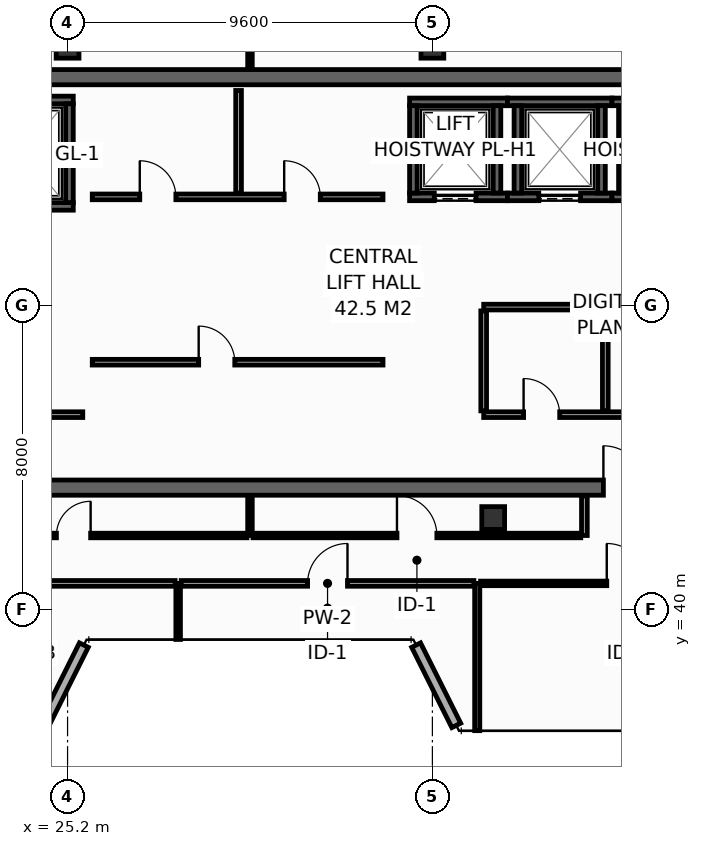
"""IFC4 building model, lengths in metres.
Left out: names, types, materials, properties, quantities, classifications, styles, units other than length and angle.
Written with IfcOpenShell. Run it as: python <this file> out.ifc"""

import sys

from ifc_helpers import new_model, si_unit, direction, frame, frame_2d, origin, origin_2d, place, context, subcontext, project, spatial, rectangle, hollow_rectangle, extrude, element, fill, save


model = new_model("IFC4")
c1 = context("Model", 3, precision=1e-05, world=origin(), true_north=direction((0.0, 1.0)))
c2 = subcontext(c1, "Body", "Model", "MODEL_VIEW")
j1 = project(units=[si_unit("LENGTHUNIT", "METRE"), si_unit("PLANEANGLEUNIT", "RADIAN")], contexts=[c1])
p1 = place(None, origin())
s1 = spatial("IfcSite", under=j1, at=p1, CompositionType="ELEMENT")
p2 = place(p1, origin())
s2 = spatial("IfcBuilding", under=s1, at=p2, CompositionType="ELEMENT")
p3 = place(p2, frame((0.0, 0.0, 323.4)))
s3 = spatial("IfcBuildingStorey", under=s2, at=p3, CompositionType="ELEMENT", Elevation=323.4)
p4 = place(p3, frame((13.7, 43.2, 0.0), z_axis=(0.0, 0.0, 1.0), x_axis=(1.0, 0.0, 0.0)))
e1 = element("IfcWall", 1, at=p4, inside=s3, PredefinedType="SHEAR", context=c2, shape_type="SweptSolid", body=[
    extrude(rectangle(XDim=32.5, YDim=0.4, at=frame_2d((16.25, 0.0))), origin(), (0.0, 0.0, 1.0), 3.9),
])
p5 = place(p4, frame((5.4, 0.0, 0.0)))
e2 = element("IfcOpeningElement", 2, at=p5, cuts=e1, PredefinedType="OPENING", context=c2, shape_type="SweptSolid", body=[
    extrude(rectangle(XDim=1.1, YDim=2.15, at=frame_2d((0.55, 1.075))), frame((0.0, 0.21, 0.0), z_axis=(0.0, -1.0, 0.0), x_axis=(1.0, 0.0, 0.0)), (0.0, 0.0, 1.0), 0.42),
])
p6 = place(p4, frame((25.6, 0.0, 0.0)))
e3 = element("IfcOpeningElement", 3, at=p6, cuts=e1, PredefinedType="OPENING", context=c2, shape_type="SweptSolid", body=[
    extrude(rectangle(XDim=1.1, YDim=2.15, at=frame_2d((0.55, 1.075))), frame((0.0, 0.21, 0.0), z_axis=(0.0, -1.0, 0.0), x_axis=(1.0, 0.0, 0.0)), (0.0, 0.0, 1.0), 0.42),
])
p7 = place(p3, frame((13.7, 54.0, 0.0), z_axis=(0.0, 0.0, 1.0), x_axis=(1.0, 0.0, 0.0)))
e4 = element("IfcWall", 4, at=p7, inside=s3, PredefinedType="SHEAR", context=c2, shape_type="SweptSolid", body=[
    extrude(rectangle(XDim=32.5, YDim=0.4, at=frame_2d((16.25, 0.0))), origin(), (0.0, 0.0, 1.0), 3.9),
])
for number, where, z_axis, x_axis in (
    (5, (25.2, 54.8, 0.0), (0.0, 0.0, 1.0), (1.0, 0.0, 0.0)),
    (6, (34.8, 54.8, 0.0), (0.0, 0.0, 1.0), (1.0, 0.0, 0.0)),
    (7, (36.4, 42.4, 0.0), (0.0, 0.0, 1.0), (1.0, 0.0, 0.0)),
):
    element("IfcColumn", number, at=place(p3, frame(where, z_axis=z_axis, x_axis=x_axis)), inside=s3, PredefinedType="COLUMN", context=c2, shape_type="SweptSolid", body=[
        extrude(hollow_rectangle(XDim=0.6, YDim=0.6, WallThickness=0.028, at=origin_2d()), origin(), (0.0, 0.0, 1.0), 4.2),
    ])
p8 = place(p3, frame((22.5, 50.6, 0.0), z_axis=(0.0, 0.0, 1.0), x_axis=(1.0, 0.0, 0.0)))
e8 = element("IfcWall", 8, at=p8, inside=s3, PredefinedType="SHEAR", context=c2, shape_type="SweptSolid", body=[
    extrude(rectangle(XDim=2.85, YDim=0.2, at=frame_2d((1.425, 0.0))), origin(), (0.0, 0.0, 1.0), 3.68),
])
p9 = place(p8, frame((0.925, 0.0, 0.0)))
e9 = element("IfcOpeningElement", 9, at=p9, cuts=e8, PredefinedType="OPENING", context=c2, shape_type="SweptSolid", body=[
    extrude(rectangle(XDim=1.25, YDim=2.3, at=frame_2d((0.625, 1.15))), frame((0.0, 0.11, 0.0), z_axis=(0.0, -1.0, 0.0), x_axis=(1.0, 0.0, 0.0)), (0.0, 0.0, 1.0), 0.22),
])
p10 = place(p3, frame((22.5, 53.4, 0.0), z_axis=(0.0, 0.0, 1.0), x_axis=(1.0, 0.0, 0.0)))
e10 = element("IfcWall", 10, at=p10, inside=s3, PredefinedType="SHEAR", context=c2, shape_type="SweptSolid", body=[
    extrude(rectangle(XDim=2.85, YDim=0.2, at=frame_2d((1.425, 0.0))), origin(), (0.0, 0.0, 1.0), 3.68),
])
p11 = place(p3, frame((25.25, 50.7, 0.0), z_axis=(0.0, 0.0, 1.0), x_axis=(0.0, 1.0, 0.0)))
e11 = element("IfcWall", 11, at=p11, inside=s3, PredefinedType="SHEAR", context=c2, shape_type="SweptSolid", body=[
    extrude(rectangle(XDim=2.6, YDim=0.2, at=frame_2d((1.3, 0.0))), origin(), (0.0, 0.0, 1.0), 3.68),
])
p12 = place(p3, frame((34.2, 50.85, 0.0), z_axis=(0.0, 0.0, 1.0), x_axis=(1.0, 0.0, 0.0)))
e12 = element("IfcWall", 12, at=p12, inside=s3, PredefinedType="SHEAR", context=c2, shape_type="SweptSolid", body=[
    extrude(rectangle(XDim=2.575, YDim=0.2, at=frame_2d((1.288, 0.0))), origin(), (0.0, 0.0, 1.0), 3.68),
])
p13 = place(p12, frame((0.65, 0.0, 0.0)))
e13 = element("IfcOpeningElement", 13, at=p13, cuts=e12, PredefinedType="OPENING", context=c2, shape_type="SweptSolid", body=[
    extrude(rectangle(XDim=1.1, YDim=2.2, at=frame_2d((0.55, 1.1))), frame((0.0, 0.11, 0.0), z_axis=(0.0, -1.0, 0.0), x_axis=(1.0, 0.0, 0.0)), (0.0, 0.0, 1.0), 0.22),
])
p14 = place(p3, frame((34.2, 53.35, 0.0), z_axis=(0.0, 0.0, 1.0), x_axis=(1.0, 0.0, 0.0)))
e14 = element("IfcWall", 14, at=p14, inside=s3, PredefinedType="SHEAR", context=c2, shape_type="SweptSolid", body=[
    extrude(rectangle(XDim=2.575, YDim=0.2, at=frame_2d((1.288, 0.0))), origin(), (0.0, 0.0, 1.0), 3.68),
])
for number, where, z_axis, x_axis in (
    (15, (34.3, 50.95, 0.0), (0.0, 0.0, 1.0), (0.0, 1.0, 0.0)),
    (16, (36.5, 50.95, 0.0), (0.0, 0.0, 1.0), (0.0, 1.0, 0.0)),
):
    element("IfcWall", number, at=place(p3, frame(where, z_axis=z_axis, x_axis=x_axis)), inside=s3, PredefinedType="SHEAR", context=c2, shape_type="SweptSolid", body=[
        extrude(rectangle(XDim=2.3, YDim=0.2, at=frame_2d((1.15, 0.0))), origin(), (0.0, 0.0, 1.0), 3.68),
    ])
p15 = place(p3, frame((36.775, 50.85, 0.0), z_axis=(0.0, 0.0, 1.0), x_axis=(1.0, 0.0, 0.0)))
e17 = element("IfcWall", 17, at=p15, inside=s3, PredefinedType="SHEAR", context=c2, shape_type="SweptSolid", body=[
    extrude(rectangle(XDim=2.75, YDim=0.2, at=frame_2d((1.375, 0.0))), origin(), (0.0, 0.0, 1.0), 3.68),
])
p16 = place(p15, frame((0.825, 0.0, 0.0)))
e18 = element("IfcOpeningElement", 18, at=p16, cuts=e17, PredefinedType="OPENING", context=c2, shape_type="SweptSolid", body=[
    extrude(rectangle(XDim=1.1, YDim=2.2, at=frame_2d((0.55, 1.1))), frame((0.0, 0.11, 0.0), z_axis=(0.0, -1.0, 0.0), x_axis=(1.0, 0.0, 0.0)), (0.0, 0.0, 1.0), 0.22),
])
p17 = place(p3, frame((36.775, 53.35, 0.0), z_axis=(0.0, 0.0, 1.0), x_axis=(1.0, 0.0, 0.0)))
e19 = element("IfcWall", 19, at=p17, inside=s3, PredefinedType="SHEAR", context=c2, shape_type="SweptSolid", body=[
    extrude(rectangle(XDim=2.75, YDim=0.2, at=frame_2d((1.375, 0.0))), origin(), (0.0, 0.0, 1.0), 3.68),
])
for number, where, z_axis, x_axis in (
    (20, (37.05, 50.95, 0.0), (0.0, 0.0, 1.0), (0.0, 1.0, 0.0)),
    (21, (39.25, 50.95, 0.0), (0.0, 0.0, 1.0), (0.0, 1.0, 0.0)),
):
    element("IfcWall", number, at=place(p3, frame(where, z_axis=z_axis, x_axis=x_axis)), inside=s3, PredefinedType="SHEAR", context=c2, shape_type="SweptSolid", body=[
        extrude(rectangle(XDim=2.3, YDim=0.2, at=frame_2d((1.15, 0.0))), origin(), (0.0, 0.0, 1.0), 3.68),
    ])
p18 = place(p3, frame((39.525, 50.85, 0.0), z_axis=(0.0, 0.0, 1.0), x_axis=(1.0, 0.0, 0.0)))
e22 = element("IfcWall", 22, at=p18, inside=s3, PredefinedType="SHEAR", context=c2, shape_type="SweptSolid", body=[
    extrude(rectangle(XDim=3.045, YDim=0.2, at=frame_2d((1.522, 0.0))), origin(), (0.0, 0.0, 1.0), 3.68),
])
p19 = place(p18, frame((0.825, 0.0, 0.0)))
e23 = element("IfcOpeningElement", 23, at=p19, cuts=e22, PredefinedType="OPENING", context=c2, shape_type="SweptSolid", body=[
    extrude(rectangle(XDim=1.1, YDim=2.2, at=frame_2d((0.55, 1.1))), frame((0.0, 0.11, 0.0), z_axis=(0.0, -1.0, 0.0), x_axis=(1.0, 0.0, 0.0)), (0.0, 0.0, 1.0), 0.22),
])
p20 = place(p3, frame((39.525, 53.35, 0.0), z_axis=(0.0, 0.0, 1.0), x_axis=(1.0, 0.0, 0.0)))
e24 = element("IfcWall", 24, at=p20, inside=s3, PredefinedType="SHEAR", context=c2, shape_type="SweptSolid", body=[
    extrude(rectangle(XDim=3.045, YDim=0.2, at=frame_2d((1.522, 0.0))), origin(), (0.0, 0.0, 1.0), 3.68),
])
p21 = place(p3, frame((39.8, 50.95, 0.0), z_axis=(0.0, 0.0, 1.0), x_axis=(0.0, 1.0, 0.0)))
e25 = element("IfcWall", 25, at=p21, inside=s3, PredefinedType="SHEAR", context=c2, shape_type="SweptSolid", body=[
    extrude(rectangle(XDim=2.3, YDim=0.2, at=frame_2d((1.15, 0.0))), origin(), (0.0, 0.0, 1.0), 3.68),
])
p22 = place(p3, frame((22.68, 45.12, 0.0), z_axis=(0.0, 0.0, 1.0), x_axis=(1.0, 0.0, 0.0)))
e26 = element("IfcWall", 26, at=p22, inside=s3, PredefinedType="PARTITIONING", context=c2, shape_type="SweptSolid", body=[
    extrude(rectangle(XDim=2.92, YDim=0.15, at=frame_2d((1.46, 0.0))), origin(), (0.0, 0.0, 1.0), 3.9),
])
p23 = place(p22, frame((0.85, 0.0, 0.0)))
e27 = element("IfcOpeningElement", 27, at=p23, cuts=e26, PredefinedType="OPENING", context=c2, shape_type="SweptSolid", body=[
    extrude(rectangle(XDim=1.1, YDim=2.15, at=frame_2d((0.55, 1.075))), frame((0.0, 0.085, 0.0), z_axis=(0.0, -1.0, 0.0), x_axis=(1.0, 0.0, 0.0)), (0.0, 0.0, 1.0), 0.17),
])
p24 = place(p3, frame((36.15, 45.12, 0.0), z_axis=(0.0, 0.0, 1.0), x_axis=(1.0, 0.0, 0.0)))
e28 = element("IfcWall", 28, at=p24, inside=s3, PredefinedType="PARTITIONING", context=c2, shape_type="SweptSolid", body=[
    extrude(rectangle(XDim=6.35, YDim=0.15, at=frame_2d((3.175, 0.0))), origin(), (0.0, 0.0, 1.0), 3.9),
])
p25 = place(p24, frame((1.05, 0.0, 0.0)))
e29 = element("IfcOpeningElement", 29, at=p25, cuts=e28, PredefinedType="OPENING", context=c2, shape_type="SweptSolid", body=[
    extrude(rectangle(XDim=0.95, YDim=2.15, at=frame_2d((0.475, 1.075))), frame((0.0, 0.085, 0.0), z_axis=(0.0, -1.0, 0.0), x_axis=(1.0, 0.0, 0.0)), (0.0, 0.0, 1.0), 0.17),
])
p26 = place(p24, frame((4.25, 0.0, 0.0)))
e30 = element("IfcOpeningElement", 30, at=p26, cuts=e28, PredefinedType="OPENING", context=c2, shape_type="SweptSolid", body=[
    extrude(rectangle(XDim=0.95, YDim=2.15, at=frame_2d((0.475, 1.075))), frame((0.0, 0.085, 0.0), z_axis=(0.0, -1.0, 0.0), x_axis=(1.0, 0.0, 0.0)), (0.0, 0.0, 1.0), 0.17),
])
p27 = place(p3, frame((36.15, 47.95, 0.0), z_axis=(0.0, 0.0, 1.0), x_axis=(1.0, 0.0, 0.0)))
e31 = element("IfcWall", 31, at=p27, inside=s3, PredefinedType="PARTITIONING", context=c2, shape_type="SweptSolid", body=[
    extrude(rectangle(XDim=6.35, YDim=0.15, at=frame_2d((3.175, 0.0))), origin(), (0.0, 0.0, 1.0), 3.9),
])
for number, where, z_axis, x_axis in (
    (32, (36.15, 45.22, 0.0), (0.0, 0.0, 1.0), (0.0, 1.0, 0.0)),
    (33, (39.35, 45.22, 0.0), (0.0, 0.0, 1.0), (0.0, 1.0, 0.0)),
):
    element("IfcWall", number, at=place(p3, frame(where, z_axis=z_axis, x_axis=x_axis)), inside=s3, PredefinedType="PARTITIONING", context=c2, shape_type="SweptSolid", body=[
        extrude(rectangle(XDim=2.63, YDim=0.15, at=frame_2d((1.315, 0.0))), origin(), (0.0, 0.0, 1.0), 3.9),
    ])
p28 = place(p3, frame((25.85, 50.85, 0.0), z_axis=(0.0, 0.0, 1.0), x_axis=(1.0, 0.0, 0.0)))
e34 = element("IfcWall", 34, at=p28, inside=s3, PredefinedType="PARTITIONING", context=c2, shape_type="SweptSolid", body=[
    extrude(rectangle(XDim=7.65, YDim=0.15, at=frame_2d((3.825, 0.0))), origin(), (0.0, 0.0, 1.0), 3.9),
])
p29 = place(p28, frame((1.25, 0.0, 0.0)))
e35 = element("IfcOpeningElement", 35, at=p29, cuts=e34, PredefinedType="OPENING", context=c2, shape_type="SweptSolid", body=[
    extrude(rectangle(XDim=0.95, YDim=2.15, at=frame_2d((0.475, 1.075))), frame((0.0, 0.085, 0.0), z_axis=(0.0, -1.0, 0.0), x_axis=(1.0, 0.0, 0.0)), (0.0, 0.0, 1.0), 0.17),
])
p30 = place(p28, frame((5.05, 0.0, 0.0)))
e36 = element("IfcOpeningElement", 36, at=p30, cuts=e34, PredefinedType="OPENING", context=c2, shape_type="SweptSolid", body=[
    extrude(rectangle(XDim=0.95, YDim=2.15, at=frame_2d((0.475, 1.075))), frame((0.0, 0.085, 0.0), z_axis=(0.0, -1.0, 0.0), x_axis=(1.0, 0.0, 0.0)), (0.0, 0.0, 1.0), 0.17),
])
p31 = place(p3, frame((29.7, 50.95, 0.0), z_axis=(0.0, 0.0, 1.0), x_axis=(0.0, 1.0, 0.0)))
e37 = element("IfcWall", 37, at=p31, inside=s3, PredefinedType="PARTITIONING", context=c2, shape_type="SweptSolid", body=[
    extrude(rectangle(XDim=2.7, YDim=0.15, at=frame_2d((1.35, 0.0))), origin(), (0.0, 0.0, 1.0), 3.9),
])
p32 = place(p3, frame((25.85, 46.5, 0.0), z_axis=(0.0, 0.0, 1.0), x_axis=(1.0, 0.0, 0.0)))
e38 = element("IfcWall", 38, at=p32, inside=s3, PredefinedType="PARTITIONING", context=c2, shape_type="SweptSolid", body=[
    extrude(rectangle(XDim=7.65, YDim=0.15, at=frame_2d((3.825, 0.0))), origin(), (0.0, 0.0, 1.0), 3.9),
])
p33 = place(p32, frame((2.8, 0.0, 0.0)))
e39 = element("IfcOpeningElement", 39, at=p33, cuts=e38, PredefinedType="OPENING", context=c2, shape_type="SweptSolid", body=[
    extrude(rectangle(XDim=0.95, YDim=2.15, at=frame_2d((0.475, 1.075))), frame((0.0, 0.085, 0.0), z_axis=(0.0, -1.0, 0.0), x_axis=(1.0, 0.0, 0.0)), (0.0, 0.0, 1.0), 0.17),
])
for number, where, z_axis, x_axis in (
    (40, (24.572, 36.943, 0.0), (0.0, 0.0, 1.0), (0.447, 0.894, 0.0)),
    (41, (34.372, 39.057, 0.0), (0.0, 0.0, 1.0), (0.447, -0.894, 0.0)),
):
    element("IfcWall", number, at=place(p3, frame(where, z_axis=z_axis, x_axis=x_axis)), inside=s3, PredefinedType="STANDARD", context=c2, shape_type="SweptSolid", body=[
        extrude(rectangle(XDim=2.363, YDim=0.26, at=frame_2d((1.182, 0.0))), origin(), (0.0, 0.0, 1.0), 3.9),
    ])
p34 = place(p3, frame((30.0, 54.22, 0.0), z_axis=(0.0, 0.0, 1.0), x_axis=(0.0, 1.0, 0.0)))
e42 = element("IfcWall", 42, at=p34, inside=s3, PredefinedType="PARTITIONING", context=c2, shape_type="SweptSolid", body=[
    extrude(rectangle(XDim=1.775, YDim=0.12, at=frame_2d((0.888, 0.0))), origin(), (0.0, 0.0, 1.0), 3.285),
])
p35 = place(p3, frame((38.8, 41.94, 0.0), z_axis=(0.0, 0.0, 1.0), x_axis=(0.0, 1.0, 0.0)))
e43 = element("IfcWall", 43, at=p35, inside=s3, PredefinedType="PARTITIONING", context=c2, shape_type="SweptSolid", body=[
    extrude(rectangle(XDim=1.04, YDim=0.15, at=frame_2d((0.52, 0.0))), origin(), (0.0, 0.0, 1.0), 3.9),
])
p36 = place(p3, frame((30.0, 41.94, 0.0), z_axis=(0.0, 0.0, 1.0), x_axis=(0.0, 1.0, 0.0)))
e44 = element("IfcWall", 44, at=p36, inside=s3, PredefinedType="PARTITIONING", context=c2, shape_type="SweptSolid", body=[
    extrude(rectangle(XDim=1.04, YDim=0.12, at=frame_2d((0.52, 0.0))), origin(), (0.0, 0.0, 1.0), 3.297),
])
p37 = place(p3, frame((20.795, 41.94, 0.0), z_axis=(0.0, 0.0, 1.0), x_axis=(1.0, 0.0, 0.0)))
e45 = element("IfcWall", 45, at=p37, inside=s3, PredefinedType="PARTITIONING", context=c2, shape_type="SweptSolid", body=[
    extrude(rectangle(XDim=9.125, YDim=0.12, at=frame_2d((4.562, 0.0))), origin(), (0.0, 0.0, 1.0), 3.9),
])
p38 = place(p37, frame((4.112, 0.0, 0.0)))
e46 = element("IfcOpeningElement", 46, at=p38, cuts=e45, PredefinedType="OPENING", context=c2, shape_type="SweptSolid", body=[
    extrude(rectangle(XDim=0.9, YDim=2.1, at=frame_2d((0.45, 1.05))), frame((0.0, 0.07, 0.0), z_axis=(0.0, -1.0, 0.0), x_axis=(1.0, 0.0, 0.0)), (0.0, 0.0, 1.0), 0.14),
])
p39 = place(p3, frame((30.08, 41.94, 0.0), z_axis=(0.0, 0.0, 1.0), x_axis=(1.0, 0.0, 0.0)))
e47 = element("IfcWall", 47, at=p39, inside=s3, PredefinedType="PARTITIONING", context=c2, shape_type="SweptSolid", body=[
    extrude(rectangle(XDim=8.625, YDim=0.12, at=frame_2d((4.312, 0.0))), origin(), (0.0, 0.0, 1.0), 3.9),
])
p40 = place(p39, frame((3.788, 0.0, 0.0)))
e48 = element("IfcOpeningElement", 48, at=p40, cuts=e47, PredefinedType="OPENING", context=c2, shape_type="SweptSolid", body=[
    extrude(rectangle(XDim=1.05, YDim=2.15, at=frame_2d((0.525, 1.075))), frame((0.0, 0.07, 0.0), z_axis=(0.0, -1.0, 0.0), x_axis=(1.0, 0.0, 0.0)), (0.0, 0.0, 1.0), 0.14),
])
p41 = place(p3, frame((28.11, 39.205, 0.0), z_axis=(0.0, 0.0, 1.0), x_axis=(0.0, 1.0, 0.0)))
e49 = element("IfcWall", 49, at=p41, inside=s3, PredefinedType="PARTITIONING", context=c2, shape_type="SweptSolid", body=[
    extrude(rectangle(XDim=1.475, YDim=0.12, at=frame_2d((0.737, 0.0))), origin(), (0.0, 0.0, 1.0), 3.9),
])
p42 = place(p3, frame((35.98, 36.805, 0.0), z_axis=(0.0, 0.0, 1.0), x_axis=(0.0, 1.0, 0.0)))
e50 = element("IfcWall", 50, at=p42, inside=s3, PredefinedType="PARTITIONING", context=c2, shape_type="SweptSolid", body=[
    extrude(rectangle(XDim=3.875, YDim=0.135, at=frame_2d((1.938, 0.0))), origin(), (0.0, 0.0, 1.0), 3.9),
])
p43 = place(p3, frame((20.337, 40.68, 0.0), z_axis=(0.0, 0.0, 1.0), x_axis=(1.0, 0.0, 0.0)))
e51 = element("IfcWall", 51, at=p43, inside=s3, PredefinedType="PARTITIONING", context=c2, shape_type="SweptSolid", body=[
    extrude(rectangle(XDim=7.693, YDim=0.15, at=frame_2d((3.846, 0.0))), origin(), (0.0, 0.0, 1.0), 3.9),
])
p44 = place(p43, frame((3.346, 0.0, 0.0)))
e52 = element("IfcOpeningElement", 52, at=p44, cuts=e51, PredefinedType="OPENING", context=c2, shape_type="SweptSolid", body=[
    extrude(rectangle(XDim=1.0, YDim=2.15, at=frame_2d((0.5, 1.075))), frame((0.0, 0.085, 0.0), z_axis=(0.0, -1.0, 0.0), x_axis=(1.0, 0.0, 0.0)), (0.0, 0.0, 1.0), 0.17),
])
p45 = place(p3, frame((28.19, 40.68, 0.0), z_axis=(0.0, 0.0, 1.0), x_axis=(1.0, 0.0, 0.0)))
e53 = element("IfcWall", 53, at=p45, inside=s3, PredefinedType="PARTITIONING", context=c2, shape_type="SweptSolid", body=[
    extrude(rectangle(XDim=7.703, YDim=0.15, at=frame_2d((3.851, 0.0))), origin(), (0.0, 0.0, 1.0), 3.9),
])
p46 = place(p45, frame((3.326, 0.0, 0.0)))
e54 = element("IfcOpeningElement", 54, at=p46, cuts=e53, PredefinedType="OPENING", context=c2, shape_type="SweptSolid", body=[
    extrude(rectangle(XDim=1.05, YDim=2.15, at=frame_2d((0.525, 1.075))), frame((0.0, 0.085, 0.0), z_axis=(0.0, -1.0, 0.0), x_axis=(1.0, 0.0, 0.0)), (0.0, 0.0, 1.0), 0.17),
])
p47 = place(p3, frame((36.067, 40.68, 0.0), z_axis=(0.0, 0.0, 1.0), x_axis=(1.0, 0.0, 0.0)))
e55 = element("IfcWall", 55, at=p47, inside=s3, PredefinedType="PARTITIONING", context=c2, shape_type="SweptSolid", body=[
    extrude(rectangle(XDim=7.693, YDim=0.12, at=frame_2d((3.846, 0.0))), origin(), (0.0, 0.0, 1.0), 3.9),
])
p48 = place(p47, frame((3.321, 0.0, 0.0)))
e56 = element("IfcOpeningElement", 56, at=p48, cuts=e55, PredefinedType="OPENING", context=c2, shape_type="SweptSolid", body=[
    extrude(rectangle(XDim=1.05, YDim=2.15, at=frame_2d((0.525, 1.075))), frame((0.0, 0.07, 0.0), z_axis=(0.0, -1.0, 0.0), x_axis=(1.0, 0.0, 0.0)), (0.0, 0.0, 1.0), 0.14),
])
p49 = place(p13, origin())
e57 = element("IfcDoor", 57, at=p49, inside=s3, OperationType="SLIDING_TO_LEFT", PredefinedType="DOOR", context=c2, shape_type="SweptSolid", body=[
    extrude(rectangle(XDim=1.1, YDim=2.2, at=frame_2d((0.55, 1.1))), frame((0.0, 0.025, 0.0), z_axis=(0.0, -1.0, 0.0), x_axis=(1.0, 0.0, 0.0)), (0.0, 0.0, 1.0), 0.05),
])
fill(e13, e57)
p50 = place(p16, origin())
e58 = element("IfcDoor", 58, at=p50, inside=s3, OperationType="SLIDING_TO_LEFT", PredefinedType="DOOR", context=c2, shape_type="SweptSolid", body=[
    extrude(rectangle(XDim=1.1, YDim=2.2, at=frame_2d((0.55, 1.1))), frame((0.0, 0.025, 0.0), z_axis=(0.0, -1.0, 0.0), x_axis=(1.0, 0.0, 0.0)), (0.0, 0.0, 1.0), 0.05),
])
fill(e18, e58)
p51 = place(p6, origin())
e59 = element("IfcDoor", 59, at=p51, inside=s3, OperationType="SINGLE_SWING_LEFT", PredefinedType="DOOR", context=c2, shape_type="SweptSolid", body=[
    extrude(rectangle(XDim=1.1, YDim=2.15, at=frame_2d((0.55, 1.075))), frame((0.0, 0.025, 0.0), z_axis=(0.0, -1.0, 0.0), x_axis=(1.0, 0.0, 0.0)), (0.0, 0.0, 1.0), 0.05),
])
fill(e3, e59)
p52 = place(p25, origin())
e60 = element("IfcDoor", 60, at=p52, inside=s3, OperationType="SINGLE_SWING_LEFT", PredefinedType="DOOR", context=c2, shape_type="SweptSolid", body=[
    extrude(rectangle(XDim=0.95, YDim=2.15, at=frame_2d((0.475, 1.075))), frame((0.0, 0.025, 0.0), z_axis=(0.0, -1.0, 0.0), x_axis=(1.0, 0.0, 0.0)), (0.0, 0.0, 1.0), 0.05),
])
fill(e29, e60)
p53 = place(p29, origin())
e61 = element("IfcDoor", 61, at=p53, inside=s3, OperationType="SINGLE_SWING_LEFT", PredefinedType="DOOR", context=c2, shape_type="SweptSolid", body=[
    extrude(rectangle(XDim=0.95, YDim=2.15, at=frame_2d((0.475, 1.075))), frame((0.0, 0.025, 0.0), z_axis=(0.0, -1.0, 0.0), x_axis=(1.0, 0.0, 0.0)), (0.0, 0.0, 1.0), 0.05),
])
fill(e35, e61)
p54 = place(p30, origin())
e62 = element("IfcDoor", 62, at=p54, inside=s3, OperationType="SINGLE_SWING_LEFT", PredefinedType="DOOR", context=c2, shape_type="SweptSolid", body=[
    extrude(rectangle(XDim=0.95, YDim=2.15, at=frame_2d((0.475, 1.075))), frame((0.0, 0.025, 0.0), z_axis=(0.0, -1.0, 0.0), x_axis=(1.0, 0.0, 0.0)), (0.0, 0.0, 1.0), 0.05),
])
fill(e36, e62)
p55 = place(p33, origin())
e63 = element("IfcDoor", 63, at=p55, inside=s3, OperationType="SINGLE_SWING_LEFT", PredefinedType="DOOR", context=c2, shape_type="SweptSolid", body=[
    extrude(rectangle(XDim=0.95, YDim=2.15, at=frame_2d((0.475, 1.075))), frame((0.0, 0.025, 0.0), z_axis=(0.0, -1.0, 0.0), x_axis=(1.0, 0.0, 0.0)), (0.0, 0.0, 1.0), 0.05),
])
fill(e39, e63)
p56 = place(p38, origin())
e64 = element("IfcDoor", 64, at=p56, inside=s3, OperationType="SINGLE_SWING_RIGHT", PredefinedType="DOOR", context=c2, shape_type="SweptSolid", body=[
    extrude(rectangle(XDim=0.9, YDim=2.1, at=frame_2d((0.45, 1.05))), frame((0.0, 0.025, 0.0), z_axis=(0.0, -1.0, 0.0), x_axis=(1.0, 0.0, 0.0)), (0.0, 0.0, 1.0), 0.05),
])
fill(e46, e64)
p57 = place(p40, origin())
e65 = element("IfcDoor", 65, at=p57, inside=s3, OperationType="SINGLE_SWING_LEFT", PredefinedType="DOOR", context=c2, shape_type="SweptSolid", body=[
    extrude(rectangle(XDim=1.05, YDim=2.15, at=frame_2d((0.525, 1.075))), frame((0.0, 0.025, 0.0), z_axis=(0.0, -1.0, 0.0), x_axis=(1.0, 0.0, 0.0)), (0.0, 0.0, 1.0), 0.05),
])
fill(e48, e65)
p58 = place(p46, origin())
e66 = element("IfcDoor", 66, at=p58, inside=s3, OperationType="SINGLE_SWING_RIGHT", PredefinedType="DOOR", context=c2, shape_type="SweptSolid", body=[
    extrude(rectangle(XDim=1.05, YDim=2.15, at=frame_2d((0.525, 1.075))), frame((0.0, 0.025, 0.0), z_axis=(0.0, -1.0, 0.0), x_axis=(1.0, 0.0, 0.0)), (0.0, 0.0, 1.0), 0.05),
])
fill(e54, e66)
p59 = place(p48, origin())
e67 = element("IfcDoor", 67, at=p59, inside=s3, OperationType="SINGLE_SWING_LEFT", PredefinedType="DOOR", context=c2, shape_type="SweptSolid", body=[
    extrude(rectangle(XDim=1.05, YDim=2.15, at=frame_2d((0.525, 1.075))), frame((0.0, 0.025, 0.0), z_axis=(0.0, -1.0, 0.0), x_axis=(1.0, 0.0, 0.0)), (0.0, 0.0, 1.0), 0.05),
])
fill(e56, e67)
save(model, sys.argv[1])
